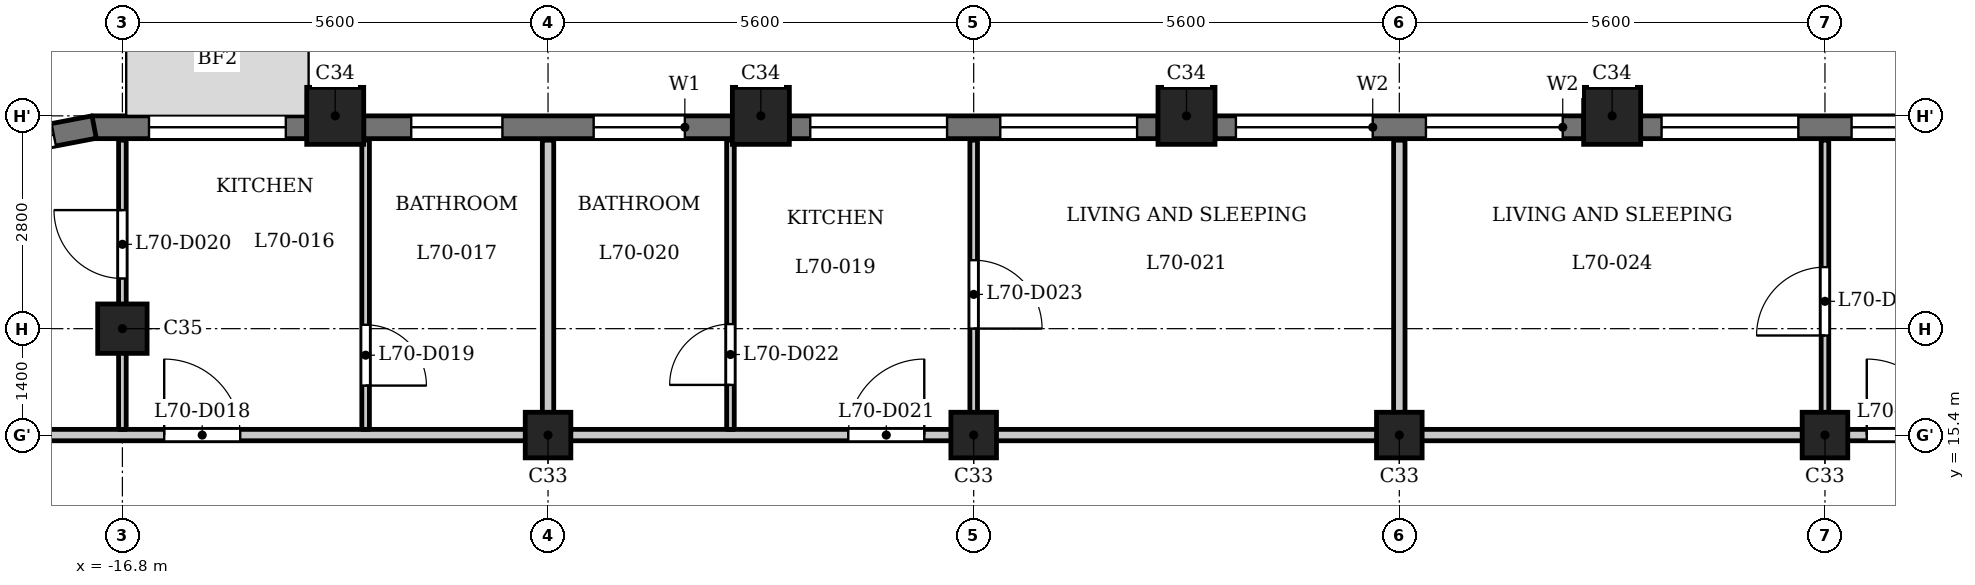
"""IFC4 building model, lengths in metres.
Left out: names, types, materials, properties, quantities, classifications, styles, units other than length and angle.
Written with IfcOpenShell. Run it as: python <this file> out.ifc"""

import sys

from ifc_helpers import new_model, si_unit, direction, frame, frame_2d, origin, origin_2d, place, context, subcontext, project, spatial, rectangle, extrude, element, fill, save


model = new_model("IFC4")
c1 = context("Model", 3, precision=1e-05, world=origin(), true_north=direction((0.0, 1.0)))
c2 = subcontext(c1, "Body", "Model", "MODEL_VIEW")
j1 = project(units=[si_unit("LENGTHUNIT", "METRE"), si_unit("PLANEANGLEUNIT", "RADIAN")], contexts=[c1])
p1 = place(None, origin())
s1 = spatial("IfcSite", under=j1, at=p1, CompositionType="ELEMENT")
p2 = place(p1, origin())
s2 = spatial("IfcBuilding", under=s1, at=p2, CompositionType="ELEMENT")
p3 = place(p2, frame((0.0, 0.0, 269.7)))
s3 = spatial("IfcBuildingStorey", under=s2, at=p3, CompositionType="ELEMENT", Elevation=269.7)
for number, where, z_axis, x_axis in (
    (1, (2.8, 19.6, 0.0), (0.0, 0.0, 1.0), (1.0, 0.0, 0.0)),
    (2, (-2.8, 19.6, 0.0), (0.0, 0.0, 1.0), (1.0, 0.0, 0.0)),
    (3, (-8.4, 19.6, 0.0), (0.0, 0.0, 1.0), (1.0, 0.0, 0.0)),
    (4, (-14.0, 19.6, 0.0), (0.0, 0.0, 1.0), (1.0, 0.0, 0.0)),
):
    element("IfcColumn", number, at=place(p3, frame(where, z_axis=z_axis, x_axis=x_axis)), inside=s3, PredefinedType="COLUMN", context=c2, shape_type="SweptSolid", body=[
        extrude(rectangle(XDim=0.75, YDim=0.75, at=origin_2d()), origin(), (0.0, 0.0, 1.0), 3.5),
    ])
p4 = place(p3, frame((-16.8, 16.8, 0.0), z_axis=(0.0, 0.0, 1.0), x_axis=(1.0, 0.0, 0.0)))
e5 = element("IfcColumn", 5, at=p4, inside=s3, PredefinedType="COLUMN", context=c2, shape_type="SweptSolid", body=[
    extrude(rectangle(XDim=0.65, YDim=0.65, at=origin_2d()), origin(), (0.0, 0.0, 1.0), 3.5),
])
for number, where, z_axis, x_axis in (
    (6, (-11.2, 15.4, 0.0), (0.0, 0.0, 1.0), (1.0, 0.0, 0.0)),
    (7, (-5.6, 15.4, 0.0), (0.0, 0.0, 1.0), (1.0, 0.0, 0.0)),
    (8, (0.0, 15.4, 0.0), (0.0, 0.0, 1.0), (1.0, 0.0, 0.0)),
    (9, (5.6, 15.4, 0.0), (0.0, 0.0, 1.0), (1.0, 0.0, 0.0)),
):
    element("IfcColumn", number, at=place(p3, frame(where, z_axis=z_axis, x_axis=x_axis)), inside=s3, PredefinedType="COLUMN", context=c2, shape_type="SweptSolid", body=[
        extrude(rectangle(XDim=0.6, YDim=0.6, at=origin_2d()), origin(), (0.0, 0.0, 1.0), 3.5),
    ])
p5 = place(p3, frame((8.025, 19.45, 0.0), z_axis=(0.0, 0.0, 1.0), x_axis=(-1.0, 0.0, 0.0)))
e10 = element("IfcWall", 10, at=p5, inside=s3, PredefinedType="SOLIDWALL", context=c2, shape_type="SweptSolid", body=[
    extrude(rectangle(XDim=4.85, YDim=0.3, at=frame_2d((2.425, 0.0))), origin(), (0.0, 0.0, 1.0), 2.55),
])
p6 = place(p5, frame((0.275, 0.0, 0.9)))
e11 = element("IfcOpeningElement", 11, at=p6, cuts=e10, PredefinedType="OPENING", context=c2, shape_type="SweptSolid", body=[
    extrude(rectangle(XDim=1.8, YDim=1.25, at=frame_2d((0.9, 0.625))), frame((0.0, 0.16, 0.0), z_axis=(0.0, -1.0, 0.0), x_axis=(1.0, 0.0, 0.0)), (0.0, 0.0, 1.0), 0.32),
])
p7 = place(p5, frame((2.775, 0.0, 0.9)))
e12 = element("IfcOpeningElement", 12, at=p7, cuts=e10, PredefinedType="OPENING", context=c2, shape_type="SweptSolid", body=[
    extrude(rectangle(XDim=1.8, YDim=1.25, at=frame_2d((0.9, 0.625))), frame((0.0, 0.16, 0.0), z_axis=(0.0, -1.0, 0.0), x_axis=(1.0, 0.0, 0.0)), (0.0, 0.0, 1.0), 0.32),
])
p8 = place(p3, frame((2.425, 19.45, 0.0), z_axis=(0.0, 0.0, 1.0), x_axis=(-1.0, 0.0, 0.0)))
e13 = element("IfcWall", 13, at=p8, inside=s3, PredefinedType="SOLIDWALL", context=c2, shape_type="SweptSolid", body=[
    extrude(rectangle(XDim=4.85, YDim=0.3, at=frame_2d((2.425, 0.0))), origin(), (0.0, 0.0, 1.0), 2.55),
])
p9 = place(p8, frame((0.275, 0.0, 0.9)))
e14 = element("IfcOpeningElement", 14, at=p9, cuts=e13, PredefinedType="OPENING", context=c2, shape_type="SweptSolid", body=[
    extrude(rectangle(XDim=1.8, YDim=1.25, at=frame_2d((0.9, 0.625))), frame((0.0, 0.16, 0.0), z_axis=(0.0, -1.0, 0.0), x_axis=(1.0, 0.0, 0.0)), (0.0, 0.0, 1.0), 0.32),
])
p10 = place(p8, frame((2.775, 0.0, 0.9)))
e15 = element("IfcOpeningElement", 15, at=p10, cuts=e13, PredefinedType="OPENING", context=c2, shape_type="SweptSolid", body=[
    extrude(rectangle(XDim=1.8, YDim=1.25, at=frame_2d((0.9, 0.625))), frame((0.0, 0.16, 0.0), z_axis=(0.0, -1.0, 0.0), x_axis=(1.0, 0.0, 0.0)), (0.0, 0.0, 1.0), 0.32),
])
p11 = place(p3, frame((-3.175, 19.45, 0.0), z_axis=(0.0, 0.0, 1.0), x_axis=(-1.0, 0.0, 0.0)))
e16 = element("IfcWall", 16, at=p11, inside=s3, PredefinedType="SOLIDWALL", context=c2, shape_type="SweptSolid", body=[
    extrude(rectangle(XDim=4.85, YDim=0.3, at=frame_2d((2.425, 0.0))), origin(), (0.0, 0.0, 1.0), 2.55),
])
p12 = place(p11, frame((0.275, 0.0, 0.9)))
e17 = element("IfcOpeningElement", 17, at=p12, cuts=e16, PredefinedType="OPENING", context=c2, shape_type="SweptSolid", body=[
    extrude(rectangle(XDim=1.8, YDim=1.25, at=frame_2d((0.9, 0.625))), frame((0.0, 0.16, 0.0), z_axis=(0.0, -1.0, 0.0), x_axis=(1.0, 0.0, 0.0)), (0.0, 0.0, 1.0), 0.32),
])
p13 = place(p11, frame((2.775, 0.0, 0.9)))
e18 = element("IfcOpeningElement", 18, at=p13, cuts=e16, PredefinedType="OPENING", context=c2, shape_type="SweptSolid", body=[
    extrude(rectangle(XDim=1.8, YDim=1.25, at=frame_2d((0.9, 0.625))), frame((0.0, 0.16, 0.0), z_axis=(0.0, -1.0, 0.0), x_axis=(1.0, 0.0, 0.0)), (0.0, 0.0, 1.0), 0.32),
])
p14 = place(p3, frame((-8.775, 19.45, 0.0), z_axis=(0.0, 0.0, 1.0), x_axis=(-1.0, 0.0, 0.0)))
e19 = element("IfcWall", 19, at=p14, inside=s3, PredefinedType="SOLIDWALL", context=c2, shape_type="SweptSolid", body=[
    extrude(rectangle(XDim=4.85, YDim=0.3, at=frame_2d((2.425, 0.0))), origin(), (0.0, 0.0, 1.0), 2.55),
])
p15 = place(p14, frame((0.625, 0.0, 0.6)))
e20 = element("IfcOpeningElement", 20, at=p15, cuts=e19, PredefinedType="OPENING", context=c2, shape_type="SweptSolid", body=[
    extrude(rectangle(XDim=1.2, YDim=1.55, at=frame_2d((0.6, 0.775))), frame((0.0, 0.16, 0.0), z_axis=(0.0, -1.0, 0.0), x_axis=(1.0, 0.0, 0.0)), (0.0, 0.0, 1.0), 0.32),
])
p16 = place(p14, frame((3.025, 0.0, 0.6)))
e21 = element("IfcOpeningElement", 21, at=p16, cuts=e19, PredefinedType="OPENING", context=c2, shape_type="SweptSolid", body=[
    extrude(rectangle(XDim=1.2, YDim=1.55, at=frame_2d((0.6, 0.775))), frame((0.0, 0.16, 0.0), z_axis=(0.0, -1.0, 0.0), x_axis=(1.0, 0.0, 0.0)), (0.0, 0.0, 1.0), 0.32),
])
p17 = place(p3, frame((-14.375, 19.45, 0.0), z_axis=(0.0, 0.0, 1.0), x_axis=(-1.0, 0.0, 0.0)))
e22 = element("IfcWall", 22, at=p17, inside=s3, PredefinedType="SOLIDWALL", context=c2, shape_type="SweptSolid", body=[
    extrude(rectangle(XDim=2.825, YDim=0.3, at=frame_2d((1.413, 0.0))), origin(), (0.0, 0.0, 1.0), 2.55),
])
p18 = place(p17, frame((0.275, 0.0, 0.9)))
e23 = element("IfcOpeningElement", 23, at=p18, cuts=e22, PredefinedType="OPENING", context=c2, shape_type="SweptSolid", body=[
    extrude(rectangle(XDim=1.8, YDim=1.25, at=frame_2d((0.9, 0.625))), frame((0.0, 0.16, 0.0), z_axis=(0.0, -1.0, 0.0), x_axis=(1.0, 0.0, 0.0)), (0.0, 0.0, 1.0), 0.32),
])
p19 = place(p3, frame((-17.172, 19.453, 0.0), z_axis=(0.0, 0.0, 1.0), x_axis=(-0.982284001233, -0.187398348234, 0.0)))
e24 = element("IfcWall", 24, at=p19, inside=s3, PredefinedType="SOLIDWALL", context=c2, shape_type="SweptSolid", body=[
    extrude(rectangle(XDim=1.881, YDim=0.3, at=frame_2d((0.941, 0.0))), origin(), (0.0, 0.0, 1.0), 2.55),
])
p20 = place(p19, frame((0.541, 0.0, 0.6)))
e25 = element("IfcOpeningElement", 25, at=p20, cuts=e24, PredefinedType="OPENING", context=c2, shape_type="SweptSolid", body=[
    extrude(rectangle(XDim=0.8, YDim=1.55, at=frame_2d((0.4, 0.775))), frame((0.0, 0.16, 0.0), z_axis=(0.0, -1.0, 0.0), x_axis=(1.0, 0.0, 0.0)), (0.0, 0.0, 1.0), 0.32),
])
p21 = place(p3, frame((-23.55, 15.4, 0.0), z_axis=(0.0, 0.0, 1.0), x_axis=(1.0, 0.0, 0.0)))
e26 = element("IfcWall", 26, at=p21, inside=s3, PredefinedType="PARTITIONING", context=c2, shape_type="SweptSolid", body=[
    extrude(rectangle(XDim=46.872, YDim=0.15, at=frame_2d((23.436, 0.0))), origin(), (0.0, 0.0, 1.0), 3.2),
])
p22 = place(p21, frame((7.3, 0.0, 0.0)))
e27 = element("IfcOpeningElement", 27, at=p22, cuts=e26, PredefinedType="OPENING", context=c2, shape_type="SweptSolid", body=[
    extrude(rectangle(XDim=1.0, YDim=2.1, at=frame_2d((0.5, 1.05))), frame((0.0, 0.085, 0.0), z_axis=(0.0, -1.0, 0.0), x_axis=(1.0, 0.0, 0.0)), (0.0, 0.0, 1.0), 0.17),
])
p23 = place(p21, frame((16.3, 0.0, 0.0)))
e28 = element("IfcOpeningElement", 28, at=p23, cuts=e26, PredefinedType="OPENING", context=c2, shape_type="SweptSolid", body=[
    extrude(rectangle(XDim=1.0, YDim=2.1, at=frame_2d((0.5, 1.05))), frame((0.0, 0.085, 0.0), z_axis=(0.0, -1.0, 0.0), x_axis=(1.0, 0.0, 0.0)), (0.0, 0.0, 1.0), 0.17),
])
p24 = place(p21, frame((29.7, 0.0, 0.0)))
e29 = element("IfcOpeningElement", 29, at=p24, cuts=e26, PredefinedType="OPENING", context=c2, shape_type="SweptSolid", body=[
    extrude(rectangle(XDim=1.0, YDim=2.1, at=frame_2d((0.5, 1.05))), frame((0.0, 0.085, 0.0), z_axis=(0.0, -1.0, 0.0), x_axis=(1.0, 0.0, 0.0)), (0.0, 0.0, 1.0), 0.17),
])
p25 = place(p21, frame((38.7, 0.0, 0.0)))
e30 = element("IfcOpeningElement", 30, at=p25, cuts=e26, PredefinedType="OPENING", context=c2, shape_type="SweptSolid", body=[
    extrude(rectangle(XDim=1.0, YDim=2.1, at=frame_2d((0.5, 1.05))), frame((0.0, 0.085, 0.0), z_axis=(0.0, -1.0, 0.0), x_axis=(1.0, 0.0, 0.0)), (0.0, 0.0, 1.0), 0.17),
])
p26 = place(p3, frame((-16.8, 15.475, 0.0), z_axis=(0.0, 0.0, 1.0), x_axis=(0.0, 1.0, 0.0)))
e31 = element("IfcWall", 31, at=p26, inside=s3, PredefinedType="PARTITIONING", context=c2, shape_type="SweptSolid", body=[
    extrude(rectangle(XDim=3.805, YDim=0.1, at=frame_2d((1.902, 0.0))), origin(), (0.0, 0.0, 1.0), 3.2),
])
p27 = place(p26, frame((1.985, 0.0, 0.0)))
e32 = element("IfcOpeningElement", 32, at=p27, cuts=e31, PredefinedType="OPENING", context=c2, shape_type="SweptSolid", body=[
    extrude(rectangle(XDim=0.9, YDim=2.1, at=frame_2d((0.45, 1.05))), frame((0.0, 0.06, 0.0), z_axis=(0.0, -1.0, 0.0), x_axis=(1.0, 0.0, 0.0)), (0.0, 0.0, 1.0), 0.12),
])
p28 = place(p3, frame((-13.6, 15.475, 0.0), z_axis=(0.0, 0.0, 1.0), x_axis=(0.0, 1.0, 0.0)))
e33 = element("IfcWall", 33, at=p28, inside=s3, PredefinedType="PARTITIONING", context=c2, shape_type="SweptSolid", body=[
    extrude(rectangle(XDim=3.805, YDim=0.1, at=frame_2d((1.902, 0.0))), origin(), (0.0, 0.0, 1.0), 3.2),
])
p29 = place(p28, frame((0.576, 0.0, 0.0)))
e34 = element("IfcOpeningElement", 34, at=p29, cuts=e33, PredefinedType="OPENING", context=c2, shape_type="SweptSolid", body=[
    extrude(rectangle(XDim=0.8, YDim=2.1, at=frame_2d((0.4, 1.05))), frame((0.0, 0.06, 0.0), z_axis=(0.0, -1.0, 0.0), x_axis=(1.0, 0.0, 0.0)), (0.0, 0.0, 1.0), 0.12),
])
p30 = place(p3, frame((-11.2, 15.475, 0.0), z_axis=(0.0, 0.0, 1.0), x_axis=(0.0, 1.0, 0.0)))
e35 = element("IfcWall", 35, at=p30, inside=s3, PredefinedType="PARTITIONING", context=c2, shape_type="SweptSolid", body=[
    extrude(rectangle(XDim=3.805, YDim=0.15, at=frame_2d((1.902, 0.0))), origin(), (0.0, 0.0, 1.0), 3.2),
])
p31 = place(p3, frame((-8.8, 15.475, 0.0), z_axis=(0.0, 0.0, 1.0), x_axis=(0.0, 1.0, 0.0)))
e36 = element("IfcWall", 36, at=p31, inside=s3, PredefinedType="PARTITIONING", context=c2, shape_type="SweptSolid", body=[
    extrude(rectangle(XDim=3.805, YDim=0.1, at=frame_2d((1.902, 0.0))), origin(), (0.0, 0.0, 1.0), 3.2),
])
p32 = place(p31, frame((0.585, 0.0, 0.0)))
e37 = element("IfcOpeningElement", 37, at=p32, cuts=e36, PredefinedType="OPENING", context=c2, shape_type="SweptSolid", body=[
    extrude(rectangle(XDim=0.8, YDim=2.1, at=frame_2d((0.4, 1.05))), frame((0.0, 0.06, 0.0), z_axis=(0.0, -1.0, 0.0), x_axis=(1.0, 0.0, 0.0)), (0.0, 0.0, 1.0), 0.12),
])
p33 = place(p3, frame((-5.6, 15.475, 0.0), z_axis=(0.0, 0.0, 1.0), x_axis=(0.0, 1.0, 0.0)))
e38 = element("IfcWall", 38, at=p33, inside=s3, PredefinedType="PARTITIONING", context=c2, shape_type="SweptSolid", body=[
    extrude(rectangle(XDim=3.805, YDim=0.1, at=frame_2d((1.902, 0.0))), origin(), (0.0, 0.0, 1.0), 3.2),
])
p34 = place(p33, frame((1.326, 0.0, 0.0)))
e39 = element("IfcOpeningElement", 39, at=p34, cuts=e38, PredefinedType="OPENING", context=c2, shape_type="SweptSolid", body=[
    extrude(rectangle(XDim=0.9, YDim=2.1, at=frame_2d((0.45, 1.05))), frame((0.0, 0.06, 0.0), z_axis=(0.0, -1.0, 0.0), x_axis=(1.0, 0.0, 0.0)), (0.0, 0.0, 1.0), 0.12),
])
p35 = place(p3, frame((0.0, 15.475, 0.0), z_axis=(0.0, 0.0, 1.0), x_axis=(0.0, 1.0, 0.0)))
e40 = element("IfcWall", 40, at=p35, inside=s3, PredefinedType="PARTITIONING", context=c2, shape_type="SweptSolid", body=[
    extrude(rectangle(XDim=3.805, YDim=0.15, at=frame_2d((1.902, 0.0))), origin(), (0.0, 0.0, 1.0), 3.2),
])
p36 = place(p3, frame((5.6, 15.475, 0.0), z_axis=(0.0, 0.0, 1.0), x_axis=(0.0, 1.0, 0.0)))
e41 = element("IfcWall", 41, at=p36, inside=s3, PredefinedType="PARTITIONING", context=c2, shape_type="SweptSolid", body=[
    extrude(rectangle(XDim=3.805, YDim=0.1, at=frame_2d((1.902, 0.0))), origin(), (0.0, 0.0, 1.0), 3.2),
])
p37 = place(p36, frame((1.235, 0.0, 0.0)))
e42 = element("IfcOpeningElement", 42, at=p37, cuts=e41, PredefinedType="OPENING", context=c2, shape_type="SweptSolid", body=[
    extrude(rectangle(XDim=0.9, YDim=2.1, at=frame_2d((0.45, 1.05))), frame((0.0, 0.06, 0.0), z_axis=(0.0, -1.0, 0.0), x_axis=(1.0, 0.0, 0.0)), (0.0, 0.0, 1.0), 0.12),
])
p38 = place(p22, origin())
e43 = element("IfcDoor", 43, at=p38, inside=s3, OperationType="SINGLE_SWING_RIGHT", PredefinedType="DOOR", context=c2, shape_type="SweptSolid", body=[
    extrude(rectangle(XDim=1.0, YDim=2.1, at=frame_2d((0.5, 1.05))), frame((0.0, 0.025, 0.0), z_axis=(0.0, -1.0, 0.0), x_axis=(1.0, 0.0, 0.0)), (0.0, 0.0, 1.0), 0.05),
])
fill(e27, e43)
p39 = place(p29, origin())
e44 = element("IfcDoor", 44, at=p39, inside=s3, OperationType="SINGLE_SWING_LEFT", PredefinedType="DOOR", context=c2, shape_type="SweptSolid", body=[
    extrude(rectangle(XDim=0.8, YDim=2.1, at=frame_2d((0.4, 1.05))), frame((0.0, 0.025, 0.0), z_axis=(0.0, -1.0, 0.0), x_axis=(1.0, 0.0, 0.0)), (0.0, 0.0, 1.0), 0.05),
])
fill(e34, e44)
p40 = place(p27, origin())
e45 = element("IfcDoor", 45, at=p40, inside=s3, OperationType="SINGLE_SWING_LEFT", PredefinedType="DOOR", context=c2, shape_type="SweptSolid", body=[
    extrude(rectangle(XDim=0.9, YDim=2.1, at=frame_2d((0.45, 1.05))), frame((0.0, 0.025, 0.0), z_axis=(0.0, -1.0, 0.0), x_axis=(1.0, 0.0, 0.0)), (0.0, 0.0, 1.0), 0.05),
])
fill(e32, e45)
p41 = place(p23, origin())
e46 = element("IfcDoor", 46, at=p41, inside=s3, OperationType="SINGLE_SWING_LEFT", PredefinedType="DOOR", context=c2, shape_type="SweptSolid", body=[
    extrude(rectangle(XDim=1.0, YDim=2.1, at=frame_2d((0.5, 1.05))), frame((0.0, 0.025, 0.0), z_axis=(0.0, -1.0, 0.0), x_axis=(1.0, 0.0, 0.0)), (0.0, 0.0, 1.0), 0.05),
])
fill(e28, e46)
p42 = place(p32, origin())
e47 = element("IfcDoor", 47, at=p42, inside=s3, OperationType="SINGLE_SWING_RIGHT", PredefinedType="DOOR", context=c2, shape_type="SweptSolid", body=[
    extrude(rectangle(XDim=0.8, YDim=2.1, at=frame_2d((0.4, 1.05))), frame((0.0, 0.025, 0.0), z_axis=(0.0, -1.0, 0.0), x_axis=(1.0, 0.0, 0.0)), (0.0, 0.0, 1.0), 0.05),
])
fill(e37, e47)
p43 = place(p34, origin())
e48 = element("IfcDoor", 48, at=p43, inside=s3, OperationType="SINGLE_SWING_LEFT", PredefinedType="DOOR", context=c2, shape_type="SweptSolid", body=[
    extrude(rectangle(XDim=0.9, YDim=2.1, at=frame_2d((0.45, 1.05))), frame((0.0, 0.025, 0.0), z_axis=(0.0, -1.0, 0.0), x_axis=(1.0, 0.0, 0.0)), (0.0, 0.0, 1.0), 0.05),
])
fill(e39, e48)
p44 = place(p24, origin())
e49 = element("IfcDoor", 49, at=p44, inside=s3, OperationType="SINGLE_SWING_RIGHT", PredefinedType="DOOR", context=c2, shape_type="SweptSolid", body=[
    extrude(rectangle(XDim=1.0, YDim=2.1, at=frame_2d((0.5, 1.05))), frame((0.0, 0.025, 0.0), z_axis=(0.0, -1.0, 0.0), x_axis=(1.0, 0.0, 0.0)), (0.0, 0.0, 1.0), 0.05),
])
fill(e29, e49)
p45 = place(p37, origin())
e50 = element("IfcDoor", 50, at=p45, inside=s3, OperationType="SINGLE_SWING_RIGHT", PredefinedType="DOOR", context=c2, shape_type="SweptSolid", body=[
    extrude(rectangle(XDim=0.9, YDim=2.1, at=frame_2d((0.45, 1.05))), frame((0.0, 0.025, 0.0), z_axis=(0.0, -1.0, 0.0), x_axis=(1.0, 0.0, 0.0)), (0.0, 0.0, 1.0), 0.05),
])
fill(e42, e50)
p46 = place(p6, origin())
e51 = element("IfcWindow", 51, at=p46, inside=s3, PartitioningType="SINGLE_PANEL", PredefinedType="WINDOW", context=c2, shape_type="SweptSolid", body=[
    extrude(rectangle(XDim=1.8, YDim=1.25, at=frame_2d((0.9, 0.625))), frame((0.0, 0.03, 0.0), z_axis=(0.0, -1.0, 0.0), x_axis=(1.0, 0.0, 0.0)), (0.0, 0.0, 1.0), 0.06),
])
fill(e11, e51)
p47 = place(p7, origin())
e52 = element("IfcWindow", 52, at=p47, inside=s3, PartitioningType="SINGLE_PANEL", PredefinedType="WINDOW", context=c2, shape_type="SweptSolid", body=[
    extrude(rectangle(XDim=1.8, YDim=1.25, at=frame_2d((0.9, 0.625))), frame((0.0, 0.03, 0.0), z_axis=(0.0, -1.0, 0.0), x_axis=(1.0, 0.0, 0.0)), (0.0, 0.0, 1.0), 0.06),
])
fill(e12, e52)
p48 = place(p9, origin())
e53 = element("IfcWindow", 53, at=p48, inside=s3, PartitioningType="SINGLE_PANEL", PredefinedType="WINDOW", context=c2, shape_type="SweptSolid", body=[
    extrude(rectangle(XDim=1.8, YDim=1.25, at=frame_2d((0.9, 0.625))), frame((0.0, 0.03, 0.0), z_axis=(0.0, -1.0, 0.0), x_axis=(1.0, 0.0, 0.0)), (0.0, 0.0, 1.0), 0.06),
])
fill(e14, e53)
p49 = place(p10, origin())
e54 = element("IfcWindow", 54, at=p49, inside=s3, PartitioningType="SINGLE_PANEL", PredefinedType="WINDOW", context=c2, shape_type="SweptSolid", body=[
    extrude(rectangle(XDim=1.8, YDim=1.25, at=frame_2d((0.9, 0.625))), frame((0.0, 0.03, 0.0), z_axis=(0.0, -1.0, 0.0), x_axis=(1.0, 0.0, 0.0)), (0.0, 0.0, 1.0), 0.06),
])
fill(e15, e54)
p50 = place(p12, origin())
e55 = element("IfcWindow", 55, at=p50, inside=s3, PartitioningType="SINGLE_PANEL", PredefinedType="WINDOW", context=c2, shape_type="SweptSolid", body=[
    extrude(rectangle(XDim=1.8, YDim=1.25, at=frame_2d((0.9, 0.625))), frame((0.0, 0.03, 0.0), z_axis=(0.0, -1.0, 0.0), x_axis=(1.0, 0.0, 0.0)), (0.0, 0.0, 1.0), 0.06),
])
fill(e17, e55)
p51 = place(p13, origin())
e56 = element("IfcWindow", 56, at=p51, inside=s3, PartitioningType="SINGLE_PANEL", PredefinedType="WINDOW", context=c2, shape_type="SweptSolid", body=[
    extrude(rectangle(XDim=1.8, YDim=1.25, at=frame_2d((0.9, 0.625))), frame((0.0, 0.03, 0.0), z_axis=(0.0, -1.0, 0.0), x_axis=(1.0, 0.0, 0.0)), (0.0, 0.0, 1.0), 0.06),
])
fill(e18, e56)
p52 = place(p15, origin())
e57 = element("IfcWindow", 57, at=p52, inside=s3, PartitioningType="SINGLE_PANEL", PredefinedType="WINDOW", context=c2, shape_type="SweptSolid", body=[
    extrude(rectangle(XDim=1.2, YDim=1.55, at=frame_2d((0.6, 0.775))), frame((0.0, 0.03, 0.0), z_axis=(0.0, -1.0, 0.0), x_axis=(1.0, 0.0, 0.0)), (0.0, 0.0, 1.0), 0.06),
])
fill(e20, e57)
p53 = place(p16, origin())
e58 = element("IfcWindow", 58, at=p53, inside=s3, PartitioningType="SINGLE_PANEL", PredefinedType="WINDOW", context=c2, shape_type="SweptSolid", body=[
    extrude(rectangle(XDim=1.2, YDim=1.55, at=frame_2d((0.6, 0.775))), frame((0.0, 0.03, 0.0), z_axis=(0.0, -1.0, 0.0), x_axis=(1.0, 0.0, 0.0)), (0.0, 0.0, 1.0), 0.06),
])
fill(e21, e58)
p54 = place(p18, origin())
e59 = element("IfcWindow", 59, at=p54, inside=s3, PartitioningType="SINGLE_PANEL", PredefinedType="WINDOW", context=c2, shape_type="SweptSolid", body=[
    extrude(rectangle(XDim=1.8, YDim=1.25, at=frame_2d((0.9, 0.625))), frame((0.0, 0.03, 0.0), z_axis=(0.0, -1.0, 0.0), x_axis=(1.0, 0.0, 0.0)), (0.0, 0.0, 1.0), 0.06),
])
fill(e23, e59)
p55 = place(p20, origin())
e60 = element("IfcWindow", 60, at=p55, inside=s3, PartitioningType="SINGLE_PANEL", PredefinedType="WINDOW", context=c2, shape_type="SweptSolid", body=[
    extrude(rectangle(XDim=0.8, YDim=1.55, at=frame_2d((0.4, 0.775))), frame((0.0, 0.03, 0.0), z_axis=(0.0, -1.0, 0.0), x_axis=(1.0, 0.0, 0.0)), (0.0, 0.0, 1.0), 0.06),
])
fill(e25, e60)
save(model, sys.argv[1])
